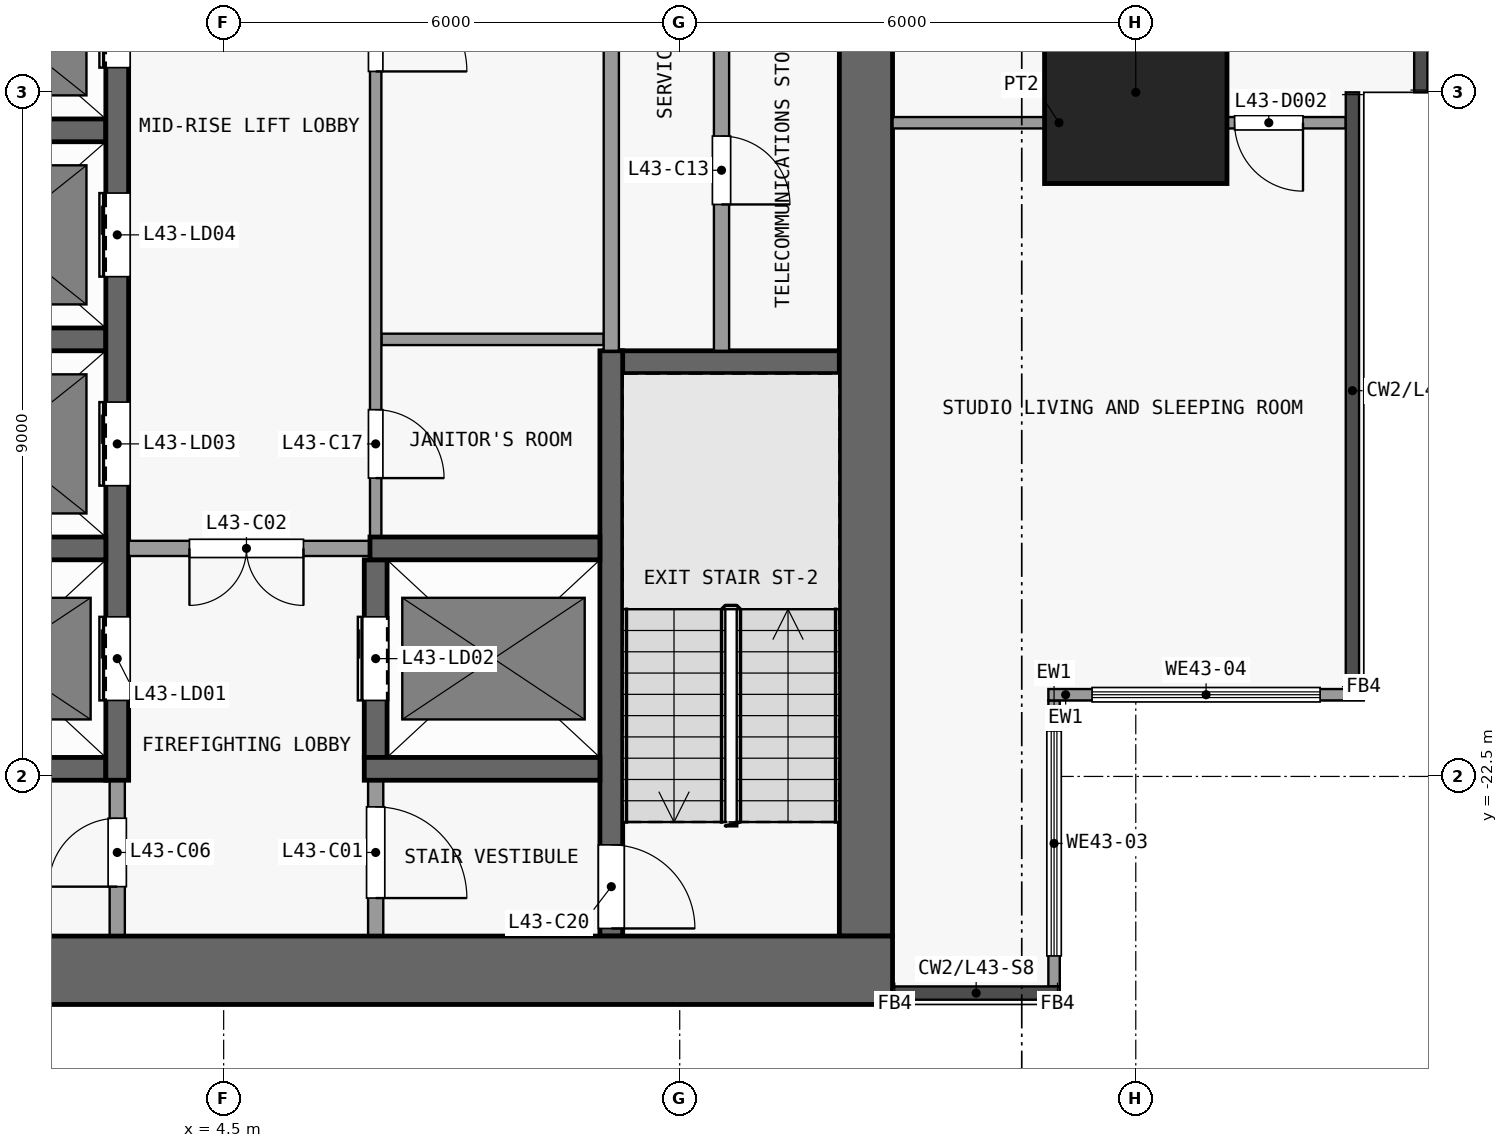
"""IFC4 building model, lengths in metres.
Left out: names, types, materials, properties, quantities, classifications, styles, units other than length and angle.
Written with IfcOpenShell. Run it as: python <this file> out.ifc"""

import sys

from ifc_helpers import new_model, si_unit, direction, frame, frame_2d, origin, origin_2d, place, context, subcontext, project, spatial, rectangle, extrude, element, fill, save


model = new_model("IFC4")
c1 = context("Model", 3, precision=1e-05, world=origin(), true_north=direction((0.0, 1.0)))
c2 = subcontext(c1, "Body", "Model", "MODEL_VIEW")
j1 = project(units=[si_unit("LENGTHUNIT", "METRE"), si_unit("PLANEANGLEUNIT", "RADIAN")], contexts=[c1])
p1 = place(None, origin())
s1 = spatial("IfcSite", under=j1, at=p1, CompositionType="ELEMENT")
p2 = place(p1, origin())
s2 = spatial("IfcBuilding", under=s1, at=p2, CompositionType="ELEMENT")
p3 = place(p2, frame((0.0, 0.0, 174.5)))
s3 = spatial("IfcBuildingStorey", under=s2, at=p3, CompositionType="ELEMENT", Elevation=174.5)
p4 = place(p3, frame((16.5, -13.5, 0.0), z_axis=(0.0, 0.0, 1.0), x_axis=(1.0, 0.0, 0.0)))
e1 = element("IfcColumn", 1, at=p4, inside=s3, PredefinedType="COLUMN", context=c2, shape_type="SweptSolid", body=[
    extrude(rectangle(XDim=2.4, YDim=2.4, at=origin_2d()), origin(), (0.0, 0.0, 1.0), 3.6),
])
p5 = place(p3, frame((-13.3, -25.05, 0.0), z_axis=(0.0, 0.0, 1.0), x_axis=(1.0, 0.0, 0.0)))
e2 = element("IfcWall", 2, at=p5, inside=s3, PredefinedType="SHEAR", context=c2, shape_type="SweptSolid", body=[
    extrude(rectangle(XDim=26.6, YDim=0.9, at=frame_2d((13.3, 0.0))), origin(), (0.0, 0.0, 1.0), 3.3),
])
p6 = place(p3, frame((12.95, -24.6, 0.0), z_axis=(0.0, 0.0, 1.0), x_axis=(0.0, 1.0, 0.0)))
e3 = element("IfcWall", 3, at=p6, inside=s3, PredefinedType="SHEAR", context=c2, shape_type="SweptSolid", body=[
    extrude(rectangle(XDim=16.1, YDim=0.7, at=frame_2d((8.05, 0.0))), origin(), (0.0, 0.0, 1.0), 3.3),
])
p7 = place(p3, frame((-3.25, -22.4, 0.0), z_axis=(0.0, 0.0, 1.0), x_axis=(1.0, 0.0, 0.0)))
e4 = element("IfcWall", 4, at=p7, inside=s3, PredefinedType="SHEAR", context=c2, shape_type="SweptSolid", body=[
    extrude(rectangle(XDim=6.2, YDim=0.3, at=frame_2d((3.1, 0.0))), origin(), (0.0, 0.0, 1.0), 3.3),
])
p8 = place(p3, frame((6.35, -22.4, 0.0), z_axis=(0.0, 0.0, 1.0), x_axis=(1.0, 0.0, 0.0)))
e5 = element("IfcWall", 5, at=p8, inside=s3, PredefinedType="SHEAR", context=c2, shape_type="SweptSolid", body=[
    extrude(rectangle(XDim=3.1, YDim=0.3, at=frame_2d((1.55, 0.0))), origin(), (0.0, 0.0, 1.0), 3.3),
])
p9 = place(p3, frame((0.15, -19.5, 0.0), z_axis=(0.0, 0.0, 1.0), x_axis=(1.0, 0.0, 0.0)))
e6 = element("IfcWall", 6, at=p9, inside=s3, PredefinedType="SHEAR", context=c2, shape_type="SweptSolid", body=[
    extrude(rectangle(XDim=2.8, YDim=0.3, at=frame_2d((1.4, 0.0))), origin(), (0.0, 0.0, 1.0), 3.3),
])
p10 = place(p3, frame((6.575, -19.5, 0.0), z_axis=(0.0, 0.0, 1.0), x_axis=(-1.0, 0.0, 0.0)))
e7 = element("IfcWall", 7, at=p10, inside=s3, PredefinedType="PARTITIONING", context=c2, shape_type="SweptSolid", body=[
    extrude(rectangle(XDim=3.325, YDim=0.2, at=frame_2d((1.663, 0.0))), origin(), (0.0, 0.0, 1.0), 3.3),
])
p11 = place(p10, frame((1.025, 0.0, 0.0)))
e8 = element("IfcOpeningElement", 8, at=p11, cuts=e7, PredefinedType="OPENING", context=c2, shape_type="SweptSolid", body=[
    extrude(rectangle(XDim=1.5, YDim=2.1, at=frame_2d((0.75, 1.05))), frame((0.0, 0.11, 0.0), z_axis=(0.0, -1.0, 0.0), x_axis=(1.0, 0.0, 0.0)), (0.0, 0.0, 1.0), 0.22),
])
p12 = place(p3, frame((6.425, -19.5, 0.0), z_axis=(0.0, 0.0, 1.0), x_axis=(1.0, 0.0, 0.0)))
e9 = element("IfcWall", 9, at=p12, inside=s3, PredefinedType="SHEAR", context=c2, shape_type="SweptSolid", body=[
    extrude(rectangle(XDim=3.025, YDim=0.3, at=frame_2d((1.512, 0.0))), origin(), (0.0, 0.0, 1.0), 3.3),
])
p13 = place(p3, frame((9.5, -17.05, 0.0), z_axis=(0.0, 0.0, 1.0), x_axis=(1.0, 0.0, 0.0)))
e10 = element("IfcWall", 10, at=p13, inside=s3, PredefinedType="SHEAR", context=c2, shape_type="SweptSolid", body=[
    extrude(rectangle(XDim=3.1, YDim=0.3, at=frame_2d((1.55, 0.0))), origin(), (0.0, 0.0, 1.0), 3.3),
])
p14 = place(p3, frame((0.15, -16.75, 0.0), z_axis=(0.0, 0.0, 1.0), x_axis=(1.0, 0.0, 0.0)))
e11 = element("IfcWall", 11, at=p14, inside=s3, PredefinedType="SHEAR", context=c2, shape_type="SweptSolid", body=[
    extrude(rectangle(XDim=2.8, YDim=0.3, at=frame_2d((1.4, 0.0))), origin(), (0.0, 0.0, 1.0), 3.3),
])
p15 = place(p3, frame((6.575, -16.75, 0.0), z_axis=(0.0, 0.0, 1.0), x_axis=(1.0, 0.0, 0.0)))
e12 = element("IfcWall", 12, at=p15, inside=s3, PredefinedType="PARTITIONING", context=c2, shape_type="SweptSolid", body=[
    extrude(rectangle(XDim=2.925, YDim=0.15, at=frame_2d((1.462, 0.0))), origin(), (0.0, 0.0, 1.0), 3.3),
])
p16 = place(p3, frame((0.15, -14.0, 0.0), z_axis=(0.0, 0.0, 1.0), x_axis=(1.0, 0.0, 0.0)))
e13 = element("IfcWall", 13, at=p16, inside=s3, PredefinedType="SHEAR", context=c2, shape_type="SweptSolid", body=[
    extrude(rectangle(XDim=2.8, YDim=0.3, at=frame_2d((1.4, 0.0))), origin(), (0.0, 0.0, 1.0), 3.3),
])
p17 = place(p3, frame((3.1, -24.6, 0.0), z_axis=(0.0, 0.0, 1.0), x_axis=(0.0, 1.0, 0.0)))
e14 = element("IfcWall", 14, at=p17, inside=s3, PredefinedType="PARTITIONING", context=c2, shape_type="SweptSolid", body=[
    extrude(rectangle(XDim=2.05, YDim=0.2, at=frame_2d((1.025, 0.0))), origin(), (0.0, 0.0, 1.0), 3.3),
])
p18 = place(p17, frame((0.65, 0.0, 0.0)))
e15 = element("IfcOpeningElement", 15, at=p18, cuts=e14, PredefinedType="OPENING", context=c2, shape_type="SweptSolid", body=[
    extrude(rectangle(XDim=0.9, YDim=2.1, at=frame_2d((0.45, 1.05))), frame((0.0, 0.11, 0.0), z_axis=(0.0, -1.0, 0.0), x_axis=(1.0, 0.0, 0.0)), (0.0, 0.0, 1.0), 0.22),
])
p19 = place(p3, frame((3.1, -22.55, 0.0), z_axis=(0.0, 0.0, 1.0), x_axis=(0.0, 1.0, 0.0)))
e16 = element("IfcWall", 16, at=p19, inside=s3, PredefinedType="SHEAR", context=c2, shape_type="SweptSolid", body=[
    extrude(rectangle(XDim=14.05, YDim=0.3, at=frame_2d((7.025, 0.0))), origin(), (0.0, 0.0, 1.0), 3.3),
])
p20 = place(p19, frame((1.05, 0.0, 0.0)))
e17 = element("IfcOpeningElement", 17, at=p20, cuts=e16, PredefinedType="OPENING", context=c2, shape_type="SweptSolid", body=[
    extrude(rectangle(XDim=1.1, YDim=2.1, at=frame_2d((0.55, 1.05))), frame((0.0, 0.16, 0.0), z_axis=(0.0, -1.0, 0.0), x_axis=(1.0, 0.0, 0.0)), (0.0, 0.0, 1.0), 0.32),
])
p21 = place(p19, frame((3.875, 0.0, 0.0)))
e18 = element("IfcOpeningElement", 18, at=p21, cuts=e16, PredefinedType="OPENING", context=c2, shape_type="SweptSolid", body=[
    extrude(rectangle(XDim=1.1, YDim=2.1, at=frame_2d((0.55, 1.05))), frame((0.0, 0.16, 0.0), z_axis=(0.0, -1.0, 0.0), x_axis=(1.0, 0.0, 0.0)), (0.0, 0.0, 1.0), 0.32),
])
p22 = place(p19, frame((6.625, 0.0, 0.0)))
e19 = element("IfcOpeningElement", 19, at=p22, cuts=e16, PredefinedType="OPENING", context=c2, shape_type="SweptSolid", body=[
    extrude(rectangle(XDim=1.1, YDim=2.1, at=frame_2d((0.55, 1.05))), frame((0.0, 0.16, 0.0), z_axis=(0.0, -1.0, 0.0), x_axis=(1.0, 0.0, 0.0)), (0.0, 0.0, 1.0), 0.32),
])
p23 = place(p19, frame((9.375, 0.0, 0.0)))
e20 = element("IfcOpeningElement", 20, at=p23, cuts=e16, PredefinedType="OPENING", context=c2, shape_type="SweptSolid", body=[
    extrude(rectangle(XDim=1.1, YDim=2.1, at=frame_2d((0.55, 1.05))), frame((0.0, 0.16, 0.0), z_axis=(0.0, -1.0, 0.0), x_axis=(1.0, 0.0, 0.0)), (0.0, 0.0, 1.0), 0.32),
])
p24 = place(p19, frame((12.125, 0.0, 0.0)))
e21 = element("IfcOpeningElement", 21, at=p24, cuts=e16, PredefinedType="OPENING", context=c2, shape_type="SweptSolid", body=[
    extrude(rectangle(XDim=1.1, YDim=2.1, at=frame_2d((0.55, 1.05))), frame((0.0, 0.16, 0.0), z_axis=(0.0, -1.0, 0.0), x_axis=(1.0, 0.0, 0.0)), (0.0, 0.0, 1.0), 0.32),
])
p25 = place(p3, frame((6.5, -22.55, 0.0), z_axis=(0.0, 0.0, 1.0), x_axis=(0.0, -1.0, 0.0)))
e22 = element("IfcWall", 22, at=p25, inside=s3, PredefinedType="PARTITIONING", context=c2, shape_type="SweptSolid", body=[
    extrude(rectangle(XDim=2.05, YDim=0.2, at=frame_2d((1.025, 0.0))), origin(), (0.0, 0.0, 1.0), 3.3),
])
p26 = place(p25, frame((0.35, 0.0, 0.0)))
e23 = element("IfcOpeningElement", 23, at=p26, cuts=e22, PredefinedType="OPENING", context=c2, shape_type="SweptSolid", body=[
    extrude(rectangle(XDim=1.2, YDim=2.1, at=frame_2d((0.6, 1.05))), frame((0.0, 0.11, 0.0), z_axis=(0.0, -1.0, 0.0), x_axis=(1.0, 0.0, 0.0)), (0.0, 0.0, 1.0), 0.22),
])
p27 = place(p3, frame((6.5, -22.25, 0.0), z_axis=(0.0, 0.0, 1.0), x_axis=(0.0, 1.0, 0.0)))
e24 = element("IfcWall", 24, at=p27, inside=s3, PredefinedType="SHEAR", context=c2, shape_type="SweptSolid", body=[
    extrude(rectangle(XDim=2.6, YDim=0.3, at=frame_2d((1.3, 0.0))), origin(), (0.0, 0.0, 1.0), 3.3),
])
p28 = place(p27, frame((0.75, 0.0, 0.0)))
e25 = element("IfcOpeningElement", 25, at=p28, cuts=e24, PredefinedType="OPENING", context=c2, shape_type="SweptSolid", body=[
    extrude(rectangle(XDim=1.1, YDim=2.1, at=frame_2d((0.55, 1.05))), frame((0.0, 0.16, 0.0), z_axis=(0.0, -1.0, 0.0), x_axis=(1.0, 0.0, 0.0)), (0.0, 0.0, 1.0), 0.32),
])
p29 = place(p3, frame((6.5, -8.5, 0.0), z_axis=(0.0, 0.0, 1.0), x_axis=(0.0, -1.0, 0.0)))
e26 = element("IfcWall", 26, at=p29, inside=s3, PredefinedType="PARTITIONING", context=c2, shape_type="SweptSolid", body=[
    extrude(rectangle(XDim=10.85, YDim=0.15, at=frame_2d((5.425, 0.0))), origin(), (0.0, 0.0, 1.0), 3.3),
])
p30 = place(p29, frame((9.175, 0.0, 0.0)))
e27 = element("IfcOpeningElement", 27, at=p30, cuts=e26, PredefinedType="OPENING", context=c2, shape_type="SweptSolid", body=[
    extrude(rectangle(XDim=0.9, YDim=2.1, at=frame_2d((0.45, 1.05))), frame((0.0, 0.085, 0.0), z_axis=(0.0, -1.0, 0.0), x_axis=(1.0, 0.0, 0.0)), (0.0, 0.0, 1.0), 0.17),
])
p31 = place(p29, frame((3.525, 0.0, 0.0)))
e28 = element("IfcOpeningElement", 28, at=p31, cuts=e26, PredefinedType="OPENING", context=c2, shape_type="SweptSolid", body=[
    extrude(rectangle(XDim=1.2, YDim=2.1, at=frame_2d((0.6, 1.05))), frame((0.0, 0.085, 0.0), z_axis=(0.0, -1.0, 0.0), x_axis=(1.0, 0.0, 0.0)), (0.0, 0.0, 1.0), 0.17),
])
p32 = place(p3, frame((9.6, -16.9, 0.0), z_axis=(0.0, 0.0, 1.0), x_axis=(0.0, -1.0, 0.0)))
e29 = element("IfcWall", 29, at=p32, inside=s3, PredefinedType="SHEAR", context=c2, shape_type="SweptSolid", body=[
    extrude(rectangle(XDim=7.7, YDim=0.3, at=frame_2d((3.85, 0.0))), origin(), (0.0, 0.0, 1.0), 3.3),
])
p33 = place(p32, frame((6.5, 0.0, 0.0)))
e30 = element("IfcOpeningElement", 30, at=p33, cuts=e29, PredefinedType="OPENING", context=c2, shape_type="SweptSolid", body=[
    extrude(rectangle(XDim=1.1, YDim=2.1, at=frame_2d((0.55, 1.05))), frame((0.0, 0.16, 0.0), z_axis=(0.0, -1.0, 0.0), x_axis=(1.0, 0.0, 0.0)), (0.0, 0.0, 1.0), 0.32),
])
p34 = place(p3, frame((9.6, -16.9, 0.0), z_axis=(0.0, 0.0, 1.0), x_axis=(0.0, 1.0, 0.0)))
e31 = element("IfcWall", 31, at=p34, inside=s3, PredefinedType="PARTITIONING", context=c2, shape_type="SweptSolid", body=[
    extrude(rectangle(XDim=8.4, YDim=0.2, at=frame_2d((4.2, 0.0))), origin(), (0.0, 0.0, 1.0), 3.3),
])
p35 = place(p3, frame((11.05, -11.9, 0.0), z_axis=(0.0, 0.0, 1.0), x_axis=(0.0, -1.0, 0.0)))
e32 = element("IfcWall", 32, at=p35, inside=s3, PredefinedType="PARTITIONING", context=c2, shape_type="SweptSolid", body=[
    extrude(rectangle(XDim=5.0, YDim=0.2, at=frame_2d((2.5, 0.0))), origin(), (0.0, 0.0, 1.0), 3.3),
])
p36 = place(p35, frame((2.175, 0.0, 0.0)))
e33 = element("IfcOpeningElement", 33, at=p36, cuts=e32, PredefinedType="OPENING", context=c2, shape_type="SweptSolid", body=[
    extrude(rectangle(XDim=0.9, YDim=2.1, at=frame_2d((0.45, 1.05))), frame((0.0, 0.11, 0.0), z_axis=(0.0, -1.0, 0.0), x_axis=(1.0, 0.0, 0.0)), (0.0, 0.0, 1.0), 0.22),
])
p37 = place(p3, frame((15.425, -21.5, 0.0), z_axis=(0.0, 0.0, 1.0), x_axis=(0.0, -1.0, 0.0)))
e34 = element("IfcWall", 34, at=p37, inside=s3, PredefinedType="SOLIDWALL", context=c2, shape_type="SweptSolid", body=[
    extrude(rectangle(XDim=3.762, YDim=0.15, at=frame_2d((1.881, 0.0))), origin(), (0.0, 0.0, 1.0), 3.3),
])
p38 = place(p37, frame((0.401, 0.0, 0.9)))
e35 = element("IfcOpeningElement", 35, at=p38, cuts=e34, PredefinedType="OPENING", context=c2, shape_type="SweptSolid", body=[
    extrude(rectangle(XDim=2.96, YDim=2.4, at=frame_2d((1.48, 1.2))), frame((0.0, 0.085, 0.0), z_axis=(0.0, -1.0, 0.0), x_axis=(1.0, 0.0, 0.0)), (0.0, 0.0, 1.0), 0.17),
])
p39 = place(p3, frame((19.5, -21.425, 0.0), z_axis=(0.0, 0.0, 1.0), x_axis=(-1.0, 0.0, 0.0)))
e36 = element("IfcWall", 36, at=p39, inside=s3, PredefinedType="SOLIDWALL", context=c2, shape_type="SweptSolid", body=[
    extrude(rectangle(XDim=4.15, YDim=0.15, at=frame_2d((2.075, 0.0))), origin(), (0.0, 0.0, 1.0), 3.3),
])
p40 = place(p39, frame((0.575, 0.0, 0.9)))
e37 = element("IfcOpeningElement", 37, at=p40, cuts=e36, PredefinedType="OPENING", context=c2, shape_type="SweptSolid", body=[
    extrude(rectangle(XDim=3.0, YDim=2.4, at=frame_2d((1.5, 1.2))), frame((0.0, 0.085, 0.0), z_axis=(0.0, -1.0, 0.0), x_axis=(1.0, 0.0, 0.0)), (0.0, 0.0, 1.0), 0.17),
])
p41 = place(p3, frame((13.3, -13.9, 0.0), z_axis=(0.0, 0.0, 1.0), x_axis=(1.0, 0.0, 0.0)))
e38 = element("IfcWall", 38, at=p41, inside=s3, PredefinedType="PARTITIONING", context=c2, shape_type="SweptSolid", body=[
    extrude(rectangle(XDim=5.962, YDim=0.15, at=frame_2d((2.981, 0.0))), origin(), (0.0, 0.0, 1.0), 3.3),
])
p42 = place(p41, frame((4.5, 0.0, 0.0)))
e39 = element("IfcOpeningElement", 39, at=p42, cuts=e38, PredefinedType="OPENING", context=c2, shape_type="SweptSolid", body=[
    extrude(rectangle(XDim=0.9, YDim=2.1, at=frame_2d((0.45, 1.05))), frame((0.0, 0.085, 0.0), z_axis=(0.0, -1.0, 0.0), x_axis=(1.0, 0.0, 0.0)), (0.0, 0.0, 1.0), 0.17),
])
p43 = place(p3, frame((16.3, -13.825, 0.0), z_axis=(0.0, 0.0, 1.0), x_axis=(0.0, 1.0, 0.0)))
e40 = element("IfcWall", 40, at=p43, inside=s3, PredefinedType="PARTITIONING", context=c2, shape_type="SweptSolid", body=[
    extrude(rectangle(XDim=2.85, YDim=0.15, at=frame_2d((1.425, 0.0))), origin(), (0.0, 0.0, 1.0), 3.3),
])
p44 = place(p20, origin())
e41 = element("IfcDoor", 41, at=p44, inside=s3, OperationType="DOUBLE_DOOR_SLIDING", PredefinedType="DOOR", context=c2, shape_type="SweptSolid", body=[
    extrude(rectangle(XDim=1.1, YDim=2.1, at=frame_2d((0.55, 1.05))), frame((0.0, 0.025, 0.0), z_axis=(0.0, -1.0, 0.0), x_axis=(1.0, 0.0, 0.0)), (0.0, 0.0, 1.0), 0.05),
])
fill(e17, e41)
p45 = place(p28, origin())
e42 = element("IfcDoor", 42, at=p45, inside=s3, OperationType="DOUBLE_DOOR_SLIDING", PredefinedType="DOOR", context=c2, shape_type="SweptSolid", body=[
    extrude(rectangle(XDim=1.1, YDim=2.1, at=frame_2d((0.55, 1.05))), frame((0.0, 0.025, 0.0), z_axis=(0.0, -1.0, 0.0), x_axis=(1.0, 0.0, 0.0)), (0.0, 0.0, 1.0), 0.05),
])
fill(e25, e42)
p46 = place(p21, origin())
e43 = element("IfcDoor", 43, at=p46, inside=s3, OperationType="DOUBLE_DOOR_SLIDING", PredefinedType="DOOR", context=c2, shape_type="SweptSolid", body=[
    extrude(rectangle(XDim=1.1, YDim=2.1, at=frame_2d((0.55, 1.05))), frame((0.0, 0.025, 0.0), z_axis=(0.0, -1.0, 0.0), x_axis=(1.0, 0.0, 0.0)), (0.0, 0.0, 1.0), 0.05),
])
fill(e18, e43)
p47 = place(p22, origin())
e44 = element("IfcDoor", 44, at=p47, inside=s3, OperationType="DOUBLE_DOOR_SLIDING", PredefinedType="DOOR", context=c2, shape_type="SweptSolid", body=[
    extrude(rectangle(XDim=1.1, YDim=2.1, at=frame_2d((0.55, 1.05))), frame((0.0, 0.025, 0.0), z_axis=(0.0, -1.0, 0.0), x_axis=(1.0, 0.0, 0.0)), (0.0, 0.0, 1.0), 0.05),
])
fill(e19, e44)
p48 = place(p23, origin())
e45 = element("IfcDoor", 45, at=p48, inside=s3, OperationType="DOUBLE_DOOR_SLIDING", PredefinedType="DOOR", context=c2, shape_type="SweptSolid", body=[
    extrude(rectangle(XDim=1.1, YDim=2.1, at=frame_2d((0.55, 1.05))), frame((0.0, 0.025, 0.0), z_axis=(0.0, -1.0, 0.0), x_axis=(1.0, 0.0, 0.0)), (0.0, 0.0, 1.0), 0.05),
])
fill(e20, e45)
p49 = place(p26, origin())
e46 = element("IfcDoor", 46, at=p49, inside=s3, OperationType="SINGLE_SWING_RIGHT", PredefinedType="DOOR", context=c2, shape_type="SweptSolid", body=[
    extrude(rectangle(XDim=1.2, YDim=2.1, at=frame_2d((0.6, 1.05))), frame((0.0, 0.025, 0.0), z_axis=(0.0, -1.0, 0.0), x_axis=(1.0, 0.0, 0.0)), (0.0, 0.0, 1.0), 0.05),
])
fill(e23, e46)
p50 = place(p11, origin())
e47 = element("IfcDoor", 47, at=p50, inside=s3, OperationType="DOUBLE_DOOR_SINGLE_SWING", PredefinedType="DOOR", context=c2, shape_type="SweptSolid", body=[
    extrude(rectangle(XDim=1.5, YDim=2.1, at=frame_2d((0.75, 1.05))), frame((0.0, 0.025, 0.0), z_axis=(0.0, -1.0, 0.0), x_axis=(1.0, 0.0, 0.0)), (0.0, 0.0, 1.0), 0.05),
])
fill(e8, e47)
p51 = place(p18, origin())
e48 = element("IfcDoor", 48, at=p51, inside=s3, OperationType="SINGLE_SWING_LEFT", PredefinedType="DOOR", context=c2, shape_type="SweptSolid", body=[
    extrude(rectangle(XDim=0.9, YDim=2.1, at=frame_2d((0.45, 1.05))), frame((0.0, 0.025, 0.0), z_axis=(0.0, -1.0, 0.0), x_axis=(1.0, 0.0, 0.0)), (0.0, 0.0, 1.0), 0.05),
])
fill(e15, e48)
p52 = place(p36, origin())
e49 = element("IfcDoor", 49, at=p52, inside=s3, OperationType="SINGLE_SWING_RIGHT", PredefinedType="DOOR", context=c2, shape_type="SweptSolid", body=[
    extrude(rectangle(XDim=0.9, YDim=2.1, at=frame_2d((0.45, 1.05))), frame((0.0, 0.025, 0.0), z_axis=(0.0, -1.0, 0.0), x_axis=(1.0, 0.0, 0.0)), (0.0, 0.0, 1.0), 0.05),
])
fill(e33, e49)
p53 = place(p30, origin())
e50 = element("IfcDoor", 50, at=p53, inside=s3, OperationType="SINGLE_SWING_RIGHT", PredefinedType="DOOR", context=c2, shape_type="SweptSolid", body=[
    extrude(rectangle(XDim=0.9, YDim=2.1, at=frame_2d((0.45, 1.05))), frame((0.0, 0.025, 0.0), z_axis=(0.0, -1.0, 0.0), x_axis=(1.0, 0.0, 0.0)), (0.0, 0.0, 1.0), 0.05),
])
fill(e27, e50)
p54 = place(p31, origin())
e51 = element("IfcDoor", 51, at=p54, inside=s3, OperationType="SINGLE_SWING_RIGHT", PredefinedType="DOOR", context=c2, shape_type="SweptSolid", body=[
    extrude(rectangle(XDim=1.2, YDim=2.1, at=frame_2d((0.6, 1.05))), frame((0.0, 0.025, 0.0), z_axis=(0.0, -1.0, 0.0), x_axis=(1.0, 0.0, 0.0)), (0.0, 0.0, 1.0), 0.05),
])
fill(e28, e51)
p55 = place(p33, origin())
e52 = element("IfcDoor", 52, at=p55, inside=s3, OperationType="SINGLE_SWING_RIGHT", PredefinedType="DOOR", context=c2, shape_type="SweptSolid", body=[
    extrude(rectangle(XDim=1.1, YDim=2.1, at=frame_2d((0.55, 1.05))), frame((0.0, 0.025, 0.0), z_axis=(0.0, -1.0, 0.0), x_axis=(1.0, 0.0, 0.0)), (0.0, 0.0, 1.0), 0.05),
])
fill(e30, e52)
p56 = place(p38, origin())
e53 = element("IfcWindow", 53, at=p56, inside=s3, PartitioningType="SINGLE_PANEL", PredefinedType="WINDOW", context=c2, shape_type="SweptSolid", body=[
    extrude(rectangle(XDim=2.96, YDim=2.4, at=frame_2d((1.48, 1.2))), frame((0.0, 0.03, 0.0), z_axis=(0.0, -1.0, 0.0), x_axis=(1.0, 0.0, 0.0)), (0.0, 0.0, 1.0), 0.06),
])
fill(e35, e53)
p57 = place(p40, origin())
e54 = element("IfcWindow", 54, at=p57, inside=s3, PartitioningType="SINGLE_PANEL", PredefinedType="WINDOW", context=c2, shape_type="SweptSolid", body=[
    extrude(rectangle(XDim=3.0, YDim=2.4, at=frame_2d((1.5, 1.2))), frame((0.0, 0.03, 0.0), z_axis=(0.0, -1.0, 0.0), x_axis=(1.0, 0.0, 0.0)), (0.0, 0.0, 1.0), 0.06),
])
fill(e37, e54)
p58 = place(p42, origin())
e55 = element("IfcDoor", 55, at=p58, inside=s3, OperationType="SINGLE_SWING_RIGHT", PredefinedType="DOOR", context=c2, shape_type="SweptSolid", body=[
    extrude(rectangle(XDim=0.9, YDim=2.1, at=frame_2d((0.45, 1.05))), frame((0.0, 0.025, 0.0), z_axis=(0.0, -1.0, 0.0), x_axis=(1.0, 0.0, 0.0)), (0.0, 0.0, 1.0), 0.05),
])
fill(e39, e55)
save(model, sys.argv[1])
